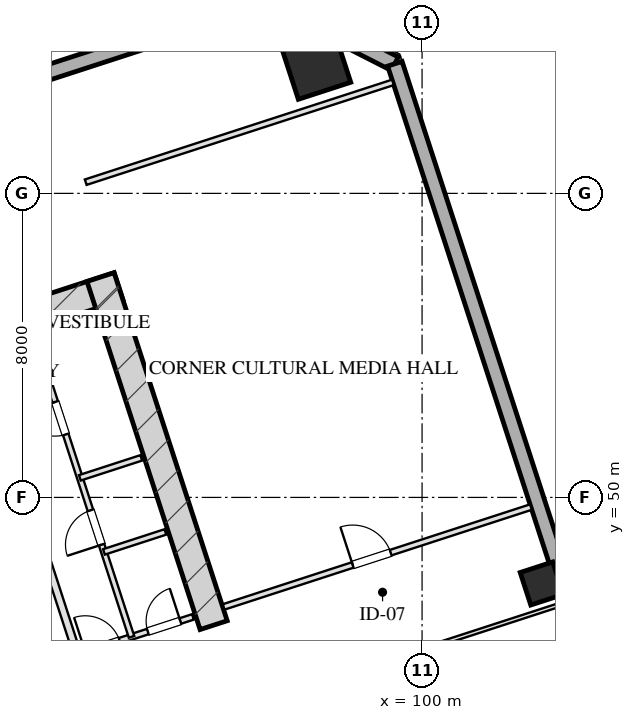
"""IFC4 building model, lengths in metres.
Left out: names, types, materials, properties, quantities, classifications, styles, units other than length and angle.
Written with IfcOpenShell. Run it as: python <this file> out.ifc"""

import sys

from ifc_helpers import new_model, si_unit, direction, frame, frame_2d, origin, origin_2d, place, context, subcontext, project, spatial, rectangle, hollow_rectangle, extrude, element, fill, save


model = new_model("IFC4")
c1 = context("Model", 3, precision=1e-05, world=origin(), true_north=direction((0.0, 1.0)))
c2 = subcontext(c1, "Body", "Model", "MODEL_VIEW")
j1 = project(units=[si_unit("LENGTHUNIT", "METRE"), si_unit("PLANEANGLEUNIT", "RADIAN")], contexts=[c1])
p1 = place(None, origin())
s1 = spatial("IfcSite", under=j1, at=p1, CompositionType="ELEMENT")
p2 = place(p1, origin())
s2 = spatial("IfcBuilding", under=s1, at=p2, CompositionType="ELEMENT")
p3 = place(p2, frame((0.0, 0.0, 81.65)))
s3 = spatial("IfcBuildingStorey", under=s2, at=p3, CompositionType="ELEMENT", Elevation=81.65)
p4 = place(p3, frame((76.272, 50.443, 0.0), z_axis=(0.0, 0.0, 1.0), x_axis=(0.951056072937, 0.309018358888, 0.0)))
e1 = element("IfcWall", 1, at=p4, inside=s3, PredefinedType="SHEAR", context=c2, shape_type="SweptSolid", body=[
    extrude(rectangle(XDim=16.55, YDim=0.75, at=frame_2d((8.275, 0.0))), origin(), (0.0, 0.0, 1.0), 3.45),
])
p5 = place(p3, frame((94.515, 46.639, 0.0), z_axis=(0.0, 0.0, 1.0), x_axis=(-0.309016134813, 0.951056795583, 0.0)))
e2 = element("IfcWall", 2, at=p5, inside=s3, PredefinedType="SHEAR", context=c2, shape_type="SweptSolid", body=[
    extrude(rectangle(XDim=9.63, YDim=0.75, at=frame_2d((4.815, 0.0))), origin(), (0.0, 0.0, 1.0), 3.45),
])
p6 = place(p3, frame((97.209, 61.388, 0.0), z_axis=(0.0, 0.0, 1.0), x_axis=(0.951056516295, 0.309016994375, 0.0)))
e3 = element("IfcColumn", 3, at=p6, inside=s3, PredefinedType="COLUMN", context=c2, shape_type="SweptSolid", body=[
    extrude(hollow_rectangle(XDim=1.45, YDim=1.45, WallThickness=0.05, at=origin_2d()), origin(), (0.0, 0.0, 1.0), 3.451),
])
p7 = place(p3, frame((103.149, 47.736, 0.0), z_axis=(0.0, 0.0, 1.0), x_axis=(0.951056516295, 0.309016994375, 0.0)))
e4 = element("IfcColumn", 4, at=p7, inside=s3, PredefinedType="COLUMN", context=c2, shape_type="SweptSolid", body=[
    extrude(hollow_rectangle(XDim=0.9, YDim=0.9, WallThickness=0.032, at=origin_2d()), origin(), (0.0, 0.0, 1.0), 3.451),
])
p8 = place(p3, frame((68.047, 53.995, 0.0), z_axis=(0.0, 0.0, 1.0), x_axis=(0.95105505922, 0.309021478754, 0.0)))
e5 = element("IfcWall", 5, at=p8, inside=s3, PredefinedType="SOLIDWALL", context=c2, shape_type="SweptSolid", body=[
    extrude(rectangle(XDim=29.4, YDim=0.4, at=frame_2d((14.7, 0.0))), origin(), (0.0, 0.0, 1.0), 2.61),
])
p9 = place(p3, frame((96.008, 63.08, 0.0), z_axis=(0.0, 0.0, 1.0), x_axis=(0.891001999643, -0.45399937955, 0.0)))
e6 = element("IfcWall", 6, at=p9, inside=s3, PredefinedType="SOLIDWALL", context=c2, shape_type="SweptSolid", body=[
    extrude(rectangle(XDim=3.677, YDim=0.4, at=frame_2d((1.839, 0.0))), origin(), (0.0, 0.0, 1.0), 2.61),
])
p10 = place(p3, frame((99.284, 61.41, 0.0), z_axis=(0.0, 0.0, 1.0), x_axis=(0.309017542002, -0.95105633836, 0.0)))
e7 = element("IfcWall", 7, at=p10, inside=s3, PredefinedType="SOLIDWALL", context=c2, shape_type="SweptSolid", body=[
    extrude(rectangle(XDim=46.4, YDim=0.4, at=frame_2d((23.2, 0.0))), origin(), (0.0, 0.0, 1.0), 2.61),
])
p11 = place(p10, frame((25.25, 0.0, 0.0)))
e8 = element("IfcOpeningElement", 8, at=p11, cuts=e7, PredefinedType="OPENING", context=c2, shape_type="SweptSolid", body=[
    extrude(rectangle(XDim=1.1, YDim=2.15, at=frame_2d((0.55, 1.075))), frame((0.0, 0.21, 0.0), z_axis=(0.0, -1.0, 0.0), x_axis=(1.0, 0.0, 0.0)), (0.0, 0.0, 1.0), 0.42),
])
p12 = place(p3, frame((90.928, 45.868, 0.0), z_axis=(0.0, 0.0, 1.0), x_axis=(-0.309042196757, 0.951048327176, 0.0)))
e9 = element("IfcWall", 9, at=p12, inside=s3, PredefinedType="PARTITIONING", context=c2, shape_type="SweptSolid", body=[
    extrude(rectangle(XDim=8.43, YDim=0.2, at=frame_2d((4.215, 0.0))), origin(), (0.0, 0.0, 1.0), 3.175),
])
p13 = place(p3, frame((90.928, 45.868, 0.0), z_axis=(0.0, 0.0, 1.0), x_axis=(0.951059297078, 0.309008435874, 0.0)))
e10 = element("IfcWall", 10, at=p13, inside=s3, PredefinedType="PARTITIONING", context=c2, shape_type="SweptSolid", body=[
    extrude(rectangle(XDim=3.2, YDim=0.15, at=frame_2d((1.6, 0.0))), origin(), (0.0, 0.0, 1.0), 3.175),
])
p14 = place(p13, frame((0.22, 0.0, 0.0)))
e11 = element("IfcOpeningElement", 11, at=p14, cuts=e10, PredefinedType="OPENING", context=c2, shape_type="SweptSolid", body=[
    extrude(rectangle(XDim=0.95, YDim=2.05, at=frame_2d((0.475, 1.025))), frame((0.0, 0.085, 0.0), z_axis=(0.0, -1.0, 0.0), x_axis=(1.0, 0.0, 0.0)), (0.0, 0.0, 1.0), 0.17),
])
p15 = place(p13, frame((1.95, 0.0, 0.0)))
e12 = element("IfcOpeningElement", 12, at=p15, cuts=e10, PredefinedType="OPENING", context=c2, shape_type="SweptSolid", body=[
    extrude(rectangle(XDim=0.9, YDim=2.05, at=frame_2d((0.45, 1.025))), frame((0.0, 0.085, 0.0), z_axis=(0.0, -1.0, 0.0), x_axis=(1.0, 0.0, 0.0)), (0.0, 0.0, 1.0), 0.17),
])
p16 = place(p3, frame((92.355, 46.331, 0.0), z_axis=(0.0, 0.0, 1.0), x_axis=(-0.309007490203, 0.951059604335, 0.0)))
e13 = element("IfcWall", 13, at=p16, inside=s3, PredefinedType="PARTITIONING", context=c2, shape_type="SweptSolid", body=[
    extrude(rectangle(XDim=8.43, YDim=0.15, at=frame_2d((4.215, 0.0))), origin(), (0.0, 0.0, 1.0), 3.175),
])
p17 = place(p16, frame((2.55, 0.0, 0.0)))
e14 = element("IfcOpeningElement", 14, at=p17, cuts=e13, PredefinedType="OPENING", context=c2, shape_type="SweptSolid", body=[
    extrude(rectangle(XDim=0.95, YDim=2.05, at=frame_2d((0.475, 1.025))), frame((0.0, 0.085, 0.0), z_axis=(0.0, -1.0, 0.0), x_axis=(1.0, 0.0, 0.0)), (0.0, 0.0, 1.0), 0.17),
])
p18 = place(p16, frame((5.6, 0.0, 0.0)))
e15 = element("IfcOpeningElement", 15, at=p18, cuts=e13, PredefinedType="OPENING", context=c2, shape_type="SweptSolid", body=[
    extrude(rectangle(XDim=0.9, YDim=2.05, at=frame_2d((0.45, 1.025))), frame((0.0, 0.085, 0.0), z_axis=(0.0, -1.0, 0.0), x_axis=(1.0, 0.0, 0.0)), (0.0, 0.0, 1.0), 0.17),
])
p19 = place(p3, frame((90.995, 50.516, 0.0), z_axis=(0.0, 0.0, 1.0), x_axis=(0.951040401051, 0.309066587596, 0.0)))
e16 = element("IfcWall", 16, at=p19, inside=s3, PredefinedType="PARTITIONING", context=c2, shape_type="SweptSolid", body=[
    extrude(rectangle(XDim=1.7, YDim=0.15, at=frame_2d((0.85, 0.0))), origin(), (0.0, 0.0, 1.0), 3.175),
])
p20 = place(p3, frame((91.628, 48.566, 0.0), z_axis=(0.0, 0.0, 1.0), x_axis=(0.951054116971, 0.309024378638, 0.0)))
e17 = element("IfcWall", 17, at=p20, inside=s3, PredefinedType="PARTITIONING", context=c2, shape_type="SweptSolid", body=[
    extrude(rectangle(XDim=1.7, YDim=0.15, at=frame_2d((0.85, 0.0))), origin(), (0.0, 0.0, 1.0), 3.175),
])
p21 = place(p3, frame((91.149, 58.294, 0.0), z_axis=(0.0, 0.0, 1.0), x_axis=(0.951062770994, 0.308997743729, 0.0)))
e18 = element("IfcWall", 18, at=p21, inside=s3, PredefinedType="PARTITIONING", context=c2, shape_type="SweptSolid", body=[
    extrude(rectangle(XDim=8.5, YDim=0.15, at=frame_2d((4.25, 0.0))), origin(), (0.0, 0.0, 1.0), 3.175),
])
p22 = place(p3, frame((94.78, 47.119, 0.0), z_axis=(0.0, 0.0, 1.0), x_axis=(0.951054329824, 0.309023723562, 0.0)))
e19 = element("IfcWall", 19, at=p22, inside=s3, PredefinedType="PARTITIONING", context=c2, shape_type="SweptSolid", body=[
    extrude(rectangle(XDim=8.5, YDim=0.15, at=frame_2d((4.25, 0.0))), origin(), (0.0, 0.0, 1.0), 3.175),
])
p23 = place(p22, frame((3.57, 0.0, 0.0)))
e20 = element("IfcOpeningElement", 20, at=p23, cuts=e19, PredefinedType="OPENING", context=c2, shape_type="SweptSolid", body=[
    extrude(rectangle(XDim=1.05, YDim=2.05, at=frame_2d((0.525, 1.025))), frame((0.0, 0.085, 0.0), z_axis=(0.0, -1.0, 0.0), x_axis=(1.0, 0.0, 0.0)), (0.0, 0.0, 1.0), 0.17),
])
p24 = place(p3, frame((86.692, 41.673, 0.0), z_axis=(0.0, 0.0, 1.0), x_axis=(0.951057050993, 0.309015348739, 0.0)))
e21 = element("IfcWall", 21, at=p24, inside=s3, PredefinedType="MOVABLE", context=c2, shape_type="SweptSolid", body=[
    extrude(rectangle(XDim=17.875, YDim=0.1, at=frame_2d((8.938, 0.0))), origin(), (0.0, 0.0, 1.0), 3.175),
])
p25 = place(p14, origin())
e22 = element("IfcDoor", 22, at=p25, inside=s3, OperationType="SINGLE_SWING_LEFT", PredefinedType="DOOR", context=c2, shape_type="SweptSolid", body=[
    extrude(rectangle(XDim=0.95, YDim=2.05, at=frame_2d((0.475, 1.025))), frame((0.0, 0.025, 0.0), z_axis=(0.0, -1.0, 0.0), x_axis=(1.0, 0.0, 0.0)), (0.0, 0.0, 1.0), 0.05),
])
fill(e11, e22)
p26 = place(p15, origin())
e23 = element("IfcDoor", 23, at=p26, inside=s3, OperationType="SINGLE_SWING_RIGHT", PredefinedType="DOOR", context=c2, shape_type="SweptSolid", body=[
    extrude(rectangle(XDim=0.9, YDim=2.05, at=frame_2d((0.45, 1.025))), frame((0.0, 0.025, 0.0), z_axis=(0.0, -1.0, 0.0), x_axis=(1.0, 0.0, 0.0)), (0.0, 0.0, 1.0), 0.05),
])
fill(e12, e23)
p27 = place(p17, origin())
e24 = element("IfcDoor", 24, at=p27, inside=s3, OperationType="SINGLE_SWING_LEFT", PredefinedType="DOOR", context=c2, shape_type="SweptSolid", body=[
    extrude(rectangle(XDim=0.95, YDim=2.05, at=frame_2d((0.475, 1.025))), frame((0.0, 0.025, 0.0), z_axis=(0.0, -1.0, 0.0), x_axis=(1.0, 0.0, 0.0)), (0.0, 0.0, 1.0), 0.05),
])
fill(e14, e24)
p28 = place(p18, origin())
e25 = element("IfcDoor", 25, at=p28, inside=s3, OperationType="SINGLE_SWING_RIGHT", PredefinedType="DOOR", context=c2, shape_type="SweptSolid", body=[
    extrude(rectangle(XDim=0.9, YDim=2.05, at=frame_2d((0.45, 1.025))), frame((0.0, 0.025, 0.0), z_axis=(0.0, -1.0, 0.0), x_axis=(1.0, 0.0, 0.0)), (0.0, 0.0, 1.0), 0.05),
])
fill(e15, e25)
p29 = place(p23, origin())
e26 = element("IfcDoor", 26, at=p29, inside=s3, OperationType="SINGLE_SWING_LEFT", PredefinedType="DOOR", context=c2, shape_type="SweptSolid", body=[
    extrude(rectangle(XDim=1.05, YDim=2.05, at=frame_2d((0.525, 1.025))), frame((0.0, 0.025, 0.0), z_axis=(0.0, -1.0, 0.0), x_axis=(1.0, 0.0, 0.0)), (0.0, 0.0, 1.0), 0.05),
])
fill(e20, e26)
save(model, sys.argv[1])
